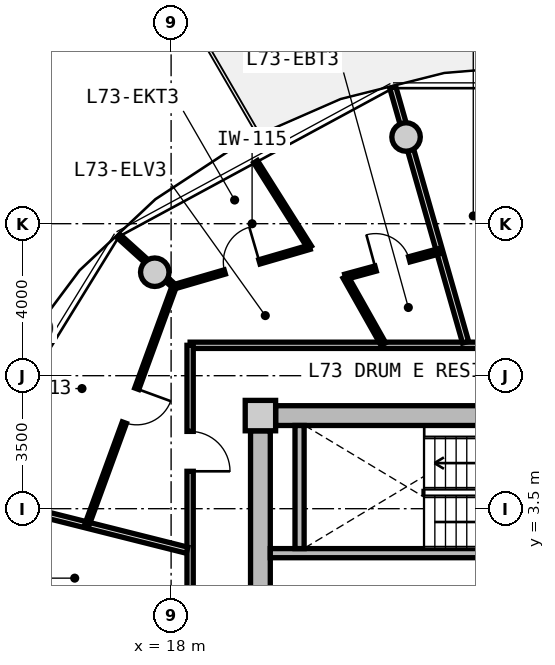
"""IFC4 building model, lengths in metres.
Left out: names, types, materials, properties, quantities, classifications, styles, units other than length and angle.
Written with IfcOpenShell. Run it as: python <this file> out.ifc"""

import sys

from ifc_helpers import new_model, si_unit, direction, frame, frame_2d, origin, origin_2d, place, context, subcontext, project, spatial, rectangle, circle, extrude, source, transform, mapped, element, fill, save


model = new_model("IFC4")
c1 = context("Model", 3, precision=1e-05, world=origin(), true_north=direction((0.0, 1.0)))
c2 = subcontext(c1, "Body", "Model", "MODEL_VIEW")
j1 = project(units=[si_unit("LENGTHUNIT", "METRE"), si_unit("PLANEANGLEUNIT", "RADIAN")], contexts=[c1])
p1 = place(None, origin())
s1 = spatial("IfcSite", under=j1, at=p1, CompositionType="ELEMENT")
p2 = place(p1, origin())
s2 = spatial("IfcBuilding", under=s1, at=p2, CompositionType="ELEMENT")
p3 = place(p2, frame((0.0, 0.0, 235.25)))
s3 = spatial("IfcBuildingStorey", under=s2, at=p3, CompositionType="ELEMENT", Elevation=235.25)
m1 = source(origin(), c2, "Body", "SweptSolid", [
    extrude(rectangle(XDim=0.8, YDim=0.8, at=origin_2d()), origin(), (0.0, 0.0, 1.0), 3.05),
])
p4 = place(p3, frame((20.35, 5.95, 0.0), z_axis=(0.0, 0.0, 1.0), x_axis=(1.0, 0.0, 0.0)))
e1 = element("IfcColumn", 1, at=p4, inside=s3, PredefinedType="COLUMN", context=c2, shape_type="MappedRepresentation", body=[
    mapped(m1, transform((0.0, 0.0, 0.0), x_axis=(1.0, 0.0, 0.0), y_axis=(0.0, 1.0, 0.0), z_axis=(0.0, 0.0, 1.0), scale=1.0)),
])
m2 = source(origin(), c2, "Body", "SweptSolid", [
    extrude(rectangle(XDim=14.5, YDim=0.52, at=frame_2d((7.25, 0.0))), origin(), (0.0, 0.0, 1.0), 2.81),
])
p5 = place(p3, frame((20.75, 5.95, 0.0), z_axis=(0.0, 0.0, 1.0), x_axis=(1.0, 0.0, 0.0)))
e2 = element("IfcWall", 2, at=p5, inside=s3, PredefinedType="SHEAR", context=c2, shape_type="MappedRepresentation", body=[
    mapped(m2, transform((0.0, 0.0, 0.0), x_axis=(1.0, 0.0, 0.0), y_axis=(0.0, 1.0, 0.0), z_axis=(0.0, 0.0, 1.0), scale=1.0)),
])
m3 = source(origin(), c2, "Body", "SweptSolid", [
    extrude(rectangle(XDim=11.1, YDim=0.52, at=frame_2d((5.55, 0.0))), origin(), (0.0, 0.0, 1.0), 2.81),
])
p6 = place(p3, frame((20.35, -5.55, 0.0), z_axis=(0.0, 0.0, 1.0), x_axis=(0.0, 1.0, 0.0)))
e3 = element("IfcWall", 3, at=p6, inside=s3, PredefinedType="SHEAR", context=c2, shape_type="MappedRepresentation", body=[
    mapped(m3, transform((0.0, 0.0, 0.0), x_axis=(1.0, 0.0, 0.0), y_axis=(0.0, 1.0, 0.0), z_axis=(0.0, 0.0, 1.0), scale=1.0)),
])
p7 = place(p6, frame((3.8, 0.0, 0.0)))
e4 = element("IfcOpeningElement", 4, at=p7, cuts=e3, PredefinedType="OPENING", context=c2, shape_type="SweptSolid", body=[
    extrude(rectangle(XDim=1.2, YDim=2.15, at=frame_2d((0.6, 1.075))), frame((0.0, 0.27, 0.0), z_axis=(0.0, -1.0, 0.0), x_axis=(1.0, 0.0, 0.0)), (0.0, 0.0, 1.0), 0.54),
])
m4 = source(origin(), c2, "Body", "SweptSolid", [
    extrude(circle(Radius=0.375, at=origin_2d()), origin(), (0.0, 0.0, 1.0), 3.05),
])
for number, where, z_axis, x_axis in (
    (5, (24.182, 13.281, 0.0), (0.0, 0.0, 1.0), (1.0, 0.0, 0.0)),
    (6, (17.57, 9.723, 0.0), (0.0, 0.0, 1.0), (1.0, 0.0, 0.0)),
):
    element("IfcColumn", number, at=place(p3, frame(where, z_axis=z_axis, x_axis=x_axis)), inside=s3, PredefinedType="COLUMN", context=c2, shape_type="MappedRepresentation", body=[
        mapped(m4, transform((0.0, 0.0, 0.0), x_axis=(1.0, 0.0, 0.0), y_axis=(0.0, 1.0, 0.0), z_axis=(0.0, 0.0, 1.0), scale=1.0)),
    ])
m5 = source(origin(), c2, "Body", "SweptSolid", [
    extrude(rectangle(XDim=7.93, YDim=0.24, at=frame_2d((3.965, 0.0))), origin(), (0.0, 0.0, 1.0), 2.81),
])
p8 = place(p3, frame((20.61, 2.33, 0.0), z_axis=(0.0, 0.0, 1.0), x_axis=(1.0, 0.0, 0.0)))
e7 = element("IfcWall", 7, at=p8, inside=s3, PredefinedType="PARTITIONING", context=c2, shape_type="MappedRepresentation", body=[
    mapped(m5, transform((0.0, 0.0, 0.0), x_axis=(1.0, 0.0, 0.0), y_axis=(0.0, 1.0, 0.0), z_axis=(0.0, 0.0, 1.0), scale=1.0)),
])
m6 = source(origin(), c2, "Body", "SweptSolid", [
    extrude(rectangle(XDim=3.24, YDim=0.24, at=frame_2d((1.62, 0.0))), origin(), (0.0, 0.0, 1.0), 2.81),
])
p9 = place(p3, frame((21.38, 2.45, 0.0), z_axis=(0.0, 0.0, 1.0), x_axis=(0.0, 1.0, 0.0)))
e8 = element("IfcWall", 8, at=p9, inside=s3, PredefinedType="PARTITIONING", context=c2, shape_type="MappedRepresentation", body=[
    mapped(m6, transform((0.0, 0.0, 0.0), x_axis=(1.0, 0.0, 0.0), y_axis=(0.0, 1.0, 0.0), z_axis=(0.0, 0.0, 1.0), scale=1.0)),
])
m7 = source(origin(), c2, "Body", "SweptSolid", [
    extrude(rectangle(XDim=8.58, YDim=0.165, at=frame_2d((4.29, 0.0))), origin(), (0.0, 0.0, 1.0), 2.795),
])
p10 = place(p3, frame((18.5, 7.8, 0.0), z_axis=(0.0, 0.0, 1.0), x_axis=(1.0, 0.0, 0.0)))
e9 = element("IfcWall", 9, at=p10, inside=s3, PredefinedType="PARTITIONING", context=c2, shape_type="MappedRepresentation", body=[
    mapped(m7, transform((0.0, 0.0, 0.0), x_axis=(1.0, 0.0, 0.0), y_axis=(0.0, 1.0, 0.0), z_axis=(0.0, 0.0, 1.0), scale=1.0)),
])
m8 = source(origin(), c2, "Body", "SweptSolid", [
    extrude(rectangle(XDim=6.88, YDim=0.165, at=frame_2d((3.44, 0.0))), origin(), (0.0, 0.0, 1.0), 2.795),
])
p11 = place(p3, frame((18.5, 0.92, 0.0), z_axis=(0.0, 0.0, 1.0), x_axis=(0.0, 1.0, 0.0)))
e10 = element("IfcWall", 10, at=p11, inside=s3, PredefinedType="PARTITIONING", context=c2, shape_type="MappedRepresentation", body=[
    mapped(m8, transform((0.0, 0.0, 0.0), x_axis=(1.0, 0.0, 0.0), y_axis=(0.0, 1.0, 0.0), z_axis=(0.0, 0.0, 1.0), scale=1.0)),
])
p12 = place(p11, frame((3.564, 0.0, 0.0)))
e11 = element("IfcOpeningElement", 11, at=p12, cuts=e10, PredefinedType="OPENING", context=c2, shape_type="SweptSolid", body=[
    extrude(rectangle(XDim=1.05, YDim=2.15, at=frame_2d((0.525, 1.075))), frame((0.0, 0.093, 0.0), z_axis=(0.0, -1.0, 0.0), x_axis=(1.0, 0.0, 0.0)), (0.0, 0.0, 1.0), 0.185),
])
m9 = source(origin(), c2, "Body", "SweptSolid", [
    extrude(rectangle(XDim=6.974, YDim=0.165, at=frame_2d((3.487, 0.0))), origin(), (0.0, 0.0, 1.0), 2.395),
])
p13 = place(p3, frame((25.749, 7.88, 0.0), z_axis=(0.0, 0.0, 1.0), x_axis=(-0.274707256801, 0.961527910703, 0.0)))
e12 = element("IfcWall", 12, at=p13, inside=s3, PredefinedType="PARTITIONING", context=c2, shape_type="MappedRepresentation", body=[
    mapped(m9, transform((0.0, 0.0, 0.0), x_axis=(1.0, 0.0, 0.0), y_axis=(0.0, 1.0, 0.0), z_axis=(0.0, 0.0, 1.0), scale=1.0)),
])
m10 = source(origin(), c2, "Body", "SweptSolid", [
    extrude(rectangle(XDim=6.157, YDim=0.165, at=frame_2d((3.079, 0.0))), origin(), (0.0, 0.0, 1.0), 2.395),
])
p14 = place(p3, frame((18.42, 2.407, 0.0), z_axis=(0.0, 0.0, 1.0), x_axis=(-0.969840867184, 0.243738984038, 0.0)))
e13 = element("IfcWall", 13, at=p14, inside=s3, PredefinedType="PARTITIONING", context=c2, shape_type="MappedRepresentation", body=[
    mapped(m10, transform((0.0, 0.0, 0.0), x_axis=(1.0, 0.0, 0.0), y_axis=(0.0, 1.0, 0.0), z_axis=(0.0, 0.0, 1.0), scale=1.0)),
])
m11 = source(origin(), c2, "Body", "SweptSolid", [
    extrude(rectangle(XDim=6.69, YDim=0.115, at=frame_2d((3.345, 0.0))), origin(), (0.0, 0.0, 1.0), 2.795),
])
p15 = place(p3, frame((18.083, 9.352, 0.0), z_axis=(0.0, 0.0, 1.0), x_axis=(-0.343693784919, -0.939081776102, 0.0)))
e14 = element("IfcWall", 14, at=p15, inside=s3, PredefinedType="PARTITIONING", context=c2, shape_type="MappedRepresentation", body=[
    mapped(m11, transform((0.0, 0.0, 0.0), x_axis=(1.0, 0.0, 0.0), y_axis=(0.0, 1.0, 0.0), z_axis=(0.0, 0.0, 1.0), scale=1.0)),
])
p16 = place(p15, frame((2.87, 0.0, 0.0)))
e15 = element("IfcOpeningElement", 15, at=p16, cuts=e14, PredefinedType="OPENING", context=c2, shape_type="SweptSolid", body=[
    extrude(rectangle(XDim=0.95, YDim=2.1, at=frame_2d((0.475, 1.05))), frame((0.0, 0.067, 0.0), z_axis=(0.0, -1.0, 0.0), x_axis=(1.0, 0.0, 0.0)), (0.0, 0.0, 1.0), 0.135),
])
m12 = source(origin(), c2, "Body", "SweptSolid", [
    extrude(rectangle(XDim=1.977, YDim=0.115, at=frame_2d((0.989, 0.0))), origin(), (0.0, 0.0, 1.0), 2.395),
])
p17 = place(p3, frame((18.083, 9.352, 0.0), z_axis=(0.0, 0.0, 1.0), x_axis=(-0.742064998629, 0.670327933037, 0.0)))
e16 = element("IfcWall", 16, at=p17, inside=s3, PredefinedType="PARTITIONING", context=c2, shape_type="MappedRepresentation", body=[
    mapped(m12, transform((0.0, 0.0, 0.0), x_axis=(1.0, 0.0, 0.0), y_axis=(0.0, 1.0, 0.0), z_axis=(0.0, 0.0, 1.0), scale=1.0)),
])
m13 = source(origin(), c2, "Body", "SweptSolid", [
    extrude(rectangle(XDim=2.035, YDim=0.14, at=frame_2d((1.018, 0.0))), origin(), (0.0, 0.0, 1.0), 2.795),
])
p18 = place(p3, frame((23.585, 7.83, 0.0), z_axis=(0.0, 0.0, 1.0), x_axis=(-0.491092509169, 0.871107425888, 0.0)))
e17 = element("IfcWall", 17, at=p18, inside=s3, PredefinedType="PARTITIONING", context=c2, shape_type="MappedRepresentation", body=[
    mapped(m13, transform((0.0, 0.0, 0.0), x_axis=(1.0, 0.0, 0.0), y_axis=(0.0, 1.0, 0.0), z_axis=(0.0, 0.0, 1.0), scale=1.0)),
])
m14 = source(origin(), c2, "Body", "SweptSolid", [
    extrude(rectangle(XDim=2.568, YDim=0.14, at=frame_2d((1.284, 0.0))), origin(), (0.0, 0.0, 1.0), 2.795),
])
p19 = place(p3, frame((22.585, 9.603, 0.0), z_axis=(0.0, 0.0, 1.0), x_axis=(0.964796726679, 0.262996722775, 0.0)))
e18 = element("IfcWall", 18, at=p19, inside=s3, PredefinedType="PARTITIONING", context=c2, shape_type="MappedRepresentation", body=[
    mapped(m14, transform((0.0, 0.0, 0.0), x_axis=(1.0, 0.0, 0.0), y_axis=(0.0, 1.0, 0.0), z_axis=(0.0, 0.0, 1.0), scale=1.0)),
])
p20 = place(p19, frame((0.824, 0.0, 0.0)))
e19 = element("IfcOpeningElement", 19, at=p20, cuts=e18, PredefinedType="OPENING", context=c2, shape_type="SweptSolid", body=[
    extrude(rectangle(XDim=0.92, YDim=2.1, at=frame_2d((0.46, 1.05))), frame((0.0, 0.08, 0.0), z_axis=(0.0, -1.0, 0.0), x_axis=(1.0, 0.0, 0.0)), (0.0, 0.0, 1.0), 0.16),
])
m15 = source(origin(), c2, "Body", "SweptSolid", [
    extrude(rectangle(XDim=2.662, YDim=0.115, at=frame_2d((1.331, 0.0))), origin(), (0.0, 0.0, 1.0), 2.795),
])
p21 = place(p3, frame((21.645, 10.38, 0.0), z_axis=(0.0, 0.0, 1.0), x_axis=(-0.533547747092, 0.845769946009, 0.0)))
e20 = element("IfcWall", 20, at=p21, inside=s3, PredefinedType="PARTITIONING", context=c2, shape_type="MappedRepresentation", body=[
    mapped(m15, transform((0.0, 0.0, 0.0), x_axis=(1.0, 0.0, 0.0), y_axis=(0.0, 1.0, 0.0), z_axis=(0.0, 0.0, 1.0), scale=1.0)),
])
m16 = source(origin(), c2, "Body", "SweptSolid", [
    extrude(rectangle(XDim=3.702, YDim=0.115, at=frame_2d((1.851, 0.0))), origin(), (0.0, 0.0, 1.0), 2.795),
])
p22 = place(p3, frame((21.645, 10.38, 0.0), z_axis=(0.0, 0.0, 1.0), x_axis=(-0.960044309887, -0.279848035645, 0.0)))
e21 = element("IfcWall", 21, at=p22, inside=s3, PredefinedType="PARTITIONING", context=c2, shape_type="MappedRepresentation", body=[
    mapped(m16, transform((0.0, 0.0, 0.0), x_axis=(1.0, 0.0, 0.0), y_axis=(0.0, 1.0, 0.0), z_axis=(0.0, 0.0, 1.0), scale=1.0)),
])
p23 = place(p22, frame((1.376, 0.0, 0.0)))
e22 = element("IfcOpeningElement", 22, at=p23, cuts=e21, PredefinedType="OPENING", context=c2, shape_type="SweptSolid", body=[
    extrude(rectangle(XDim=0.95, YDim=2.1, at=frame_2d((0.475, 1.05))), frame((0.0, 0.067, 0.0), z_axis=(0.0, -1.0, 0.0), x_axis=(1.0, 0.0, 0.0)), (0.0, 0.0, 1.0), 0.135),
])
m17 = source(origin(), c2, "Body", "SweptSolid", [
    extrude(rectangle(XDim=1.05, YDim=2.15, at=frame_2d((0.525, 1.075))), frame((0.0, 0.025, 0.0), z_axis=(0.0, -1.0, 0.0), x_axis=(1.0, 0.0, 0.0)), (0.0, 0.0, 1.0), 0.05),
])
p24 = place(p12, frame((1.05, 0.0, 0.0), z_axis=(0.0, 0.0, 1.0), x_axis=(-1.0, 0.0, 0.0)))
e23 = element("IfcDoor", 23, at=p24, inside=s3, OperationType="SINGLE_SWING_RIGHT", PredefinedType="DOOR", context=c2, shape_type="MappedRepresentation", body=[
    mapped(m17, transform((0.0, 0.0, 0.0), x_axis=(1.0, 0.0, 0.0), y_axis=(0.0, 1.0, 0.0), z_axis=(0.0, 0.0, 1.0), scale=1.0)),
])
fill(e11, e23)
m18 = source(origin(), c2, "Body", "SweptSolid", [
    extrude(rectangle(XDim=0.92, YDim=2.1, at=frame_2d((0.46, 1.05))), frame((0.0, 0.025, 0.0), z_axis=(0.0, -1.0, 0.0), x_axis=(1.0, 0.0, 0.0)), (0.0, 0.0, 1.0), 0.05),
])
p25 = place(p20, origin())
e24 = element("IfcDoor", 24, at=p25, inside=s3, OperationType="SINGLE_SWING_LEFT", PredefinedType="DOOR", context=c2, shape_type="MappedRepresentation", body=[
    mapped(m18, transform((0.0, 0.0, 0.0), x_axis=(1.0, 0.0, 0.0), y_axis=(0.0, 1.0, 0.0), z_axis=(0.0, 0.0, 1.0), scale=1.0)),
])
fill(e19, e24)
m19 = source(origin(), c2, "Body", "SweptSolid", [
    extrude(rectangle(XDim=0.95, YDim=2.1, at=frame_2d((0.475, 1.05))), frame((0.0, 0.025, 0.0), z_axis=(0.0, -1.0, 0.0), x_axis=(1.0, 0.0, 0.0)), (0.0, 0.0, 1.0), 0.05),
])
p26 = place(p23, frame((0.95, 0.0, 0.0), z_axis=(0.0, 0.0, 1.0), x_axis=(-1.0, 0.0, 0.0)))
e25 = element("IfcDoor", 25, at=p26, inside=s3, OperationType="SINGLE_SWING_RIGHT", PredefinedType="DOOR", context=c2, shape_type="MappedRepresentation", body=[
    mapped(m19, transform((0.0, 0.0, 0.0), x_axis=(1.0, 0.0, 0.0), y_axis=(0.0, 1.0, 0.0), z_axis=(0.0, 0.0, 1.0), scale=1.0)),
])
fill(e22, e25)
p27 = place(p16, origin())
e26 = element("IfcDoor", 26, at=p27, inside=s3, OperationType="SINGLE_SWING_LEFT", PredefinedType="DOOR", context=c2, shape_type="MappedRepresentation", body=[
    mapped(m19, transform((0.0, 0.0, 0.0), x_axis=(1.0, 0.0, 0.0), y_axis=(0.0, 1.0, 0.0), z_axis=(0.0, 0.0, 1.0), scale=1.0)),
])
fill(e15, e26)
save(model, sys.argv[1])
